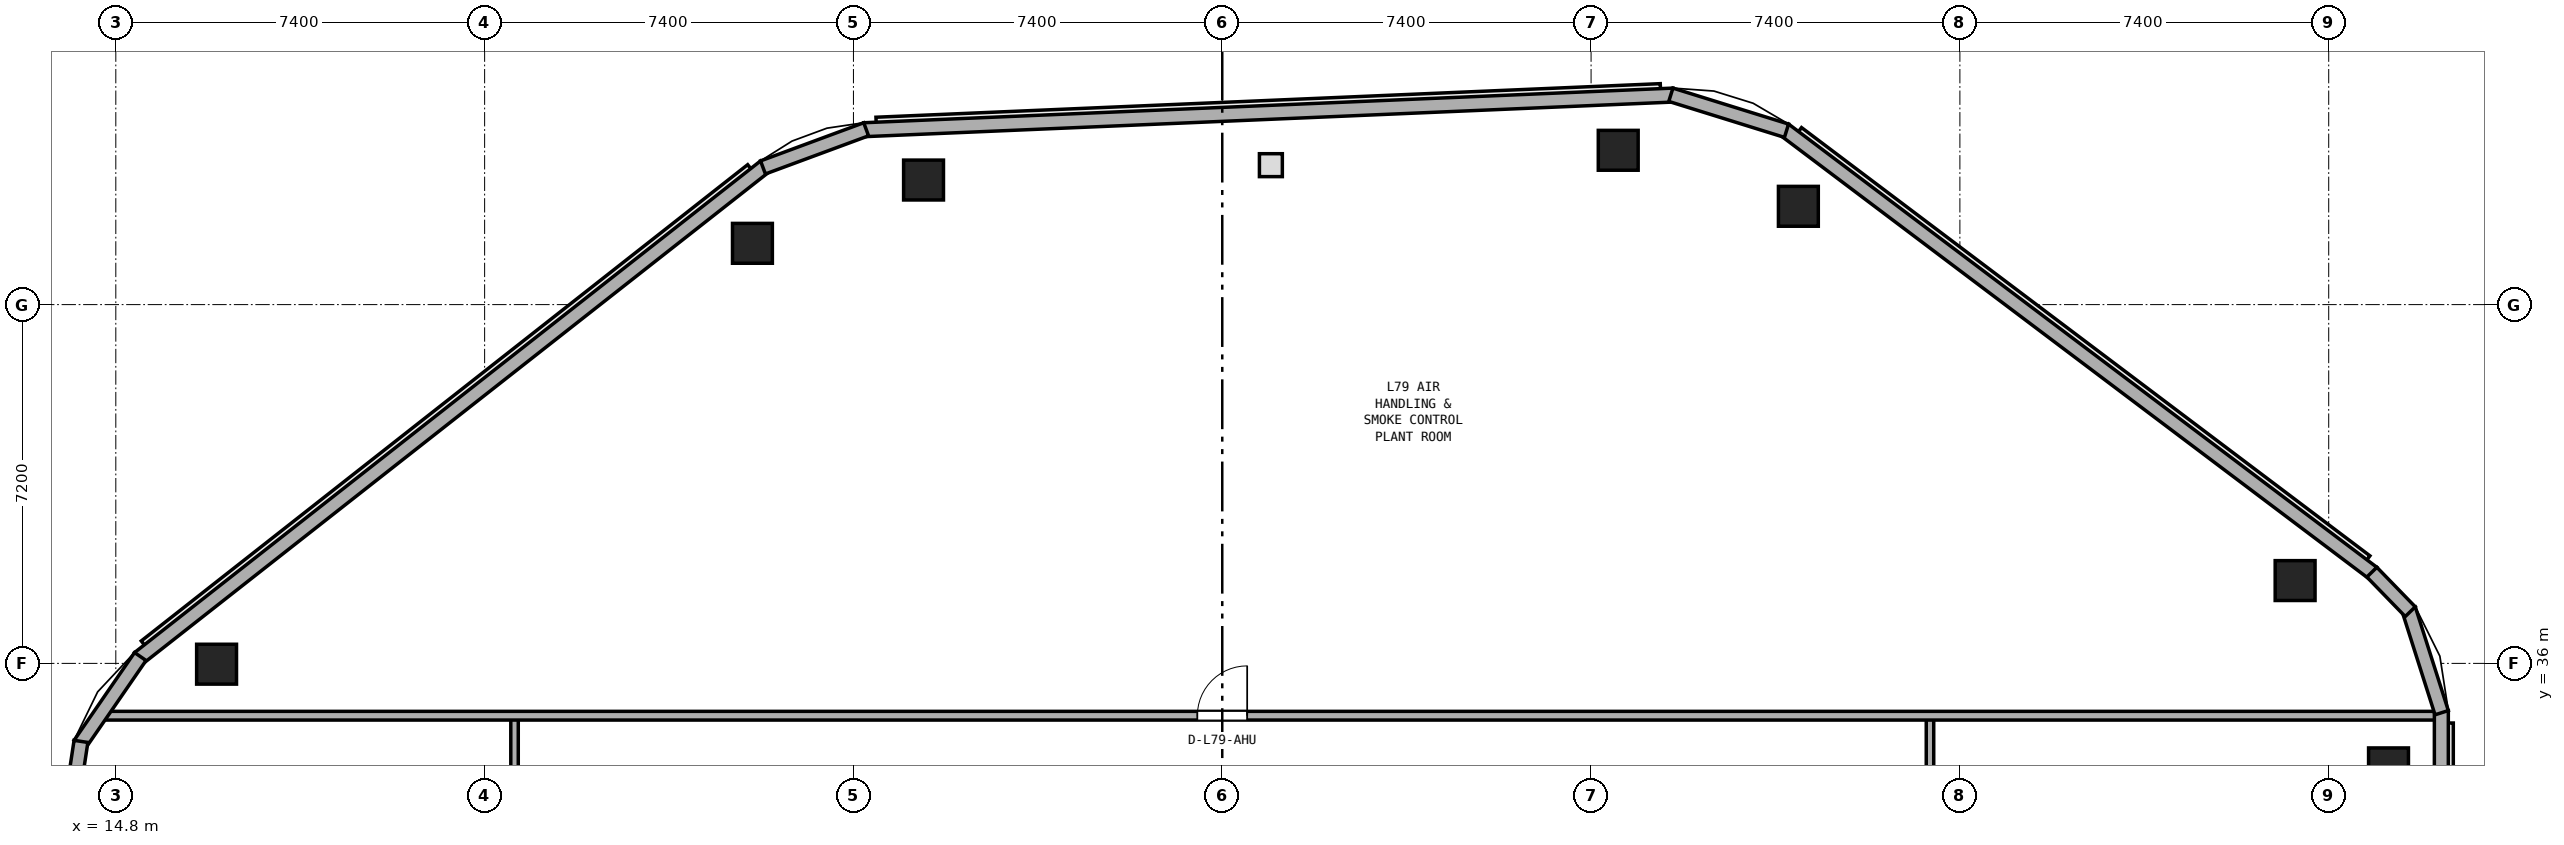
"""IFC4 building model, lengths in metres.
Left out: names, types, materials, properties, quantities, classifications, styles, units other than length and angle.
Written with IfcOpenShell. Run it as: python <this file> out.ifc"""

import sys

from ifc_helpers import new_model, si_unit, direction, frame, frame_2d, origin, origin_2d, place, context, subcontext, project, spatial, rectangle, extrude, element, fill, save


model = new_model("IFC4")
c1 = context("Model", 3, precision=1e-05, world=origin(), true_north=direction((0.0, 1.0)))
c2 = subcontext(c1, "Body", "Model", "MODEL_VIEW")
j1 = project(units=[si_unit("LENGTHUNIT", "METRE"), si_unit("PLANEANGLEUNIT", "RADIAN")], contexts=[c1])
p1 = place(None, origin())
s1 = spatial("IfcSite", under=j1, at=p1, CompositionType="ELEMENT")
p2 = place(p1, origin())
s2 = spatial("IfcBuilding", under=s1, at=p2, CompositionType="ELEMENT")
p3 = place(p2, frame((0.0, 0.0, 308.6)))
s3 = spatial("IfcBuildingStorey", under=s2, at=p3, CompositionType="ELEMENT", Elevation=308.6)
for number, where, z_axis, x_axis in (
    (1, (60.4, 33.903, 0.0), (0.0, 0.0, 1.0), (1.0, 0.0, 0.0)),
    (2, (58.526, 37.662, 0.0), (0.0, 0.0, 1.0), (1.0, 0.0, 0.0)),
    (3, (48.559, 45.173, 0.0), (0.0, 0.0, 1.0), (1.0, 0.0, 0.0)),
    (4, (44.945, 46.297, 0.0), (0.0, 0.0, 1.0), (1.0, 0.0, 0.0)),
    (5, (31.007, 45.7, 0.0), (0.0, 0.0, 1.0), (1.0, 0.0, 0.0)),
    (6, (27.573, 44.43, 0.0), (0.0, 0.0, 1.0), (1.0, 0.0, 0.0)),
    (7, (16.822, 35.984, 0.0), (0.0, 0.0, 1.0), (1.0, 0.0, 0.0)),
):
    element("IfcColumn", number, at=place(p3, frame(where, z_axis=z_axis, x_axis=x_axis)), inside=s3, PredefinedType="COLUMN", context=c2, shape_type="SweptSolid", body=[
        extrude(rectangle(XDim=0.8, YDim=0.8, at=origin_2d()), origin(), (0.0, 0.0, 1.0), 4.8),
    ])
p4 = place(p3, frame((51.2, 15.45, 0.0), z_axis=(0.0, 0.0, 1.0), x_axis=(0.0, 1.0, 0.0)))
e8 = element("IfcWall", 8, at=p4, inside=s3, PredefinedType="PARTITIONING", context=c2, shape_type="SweptSolid", body=[
    extrude(rectangle(XDim=19.5, YDim=0.15, at=frame_2d((9.75, 0.0))), origin(), (0.0, 0.0, 1.0), 4.52),
])
p5 = place(p4, frame((9.15, 0.0, 0.0)))
e9 = element("IfcOpeningElement", 9, at=p5, cuts=e8, PredefinedType="OPENING", context=c2, shape_type="SweptSolid", body=[
    extrude(rectangle(XDim=1.2, YDim=2.15, at=frame_2d((0.6, 1.075))), frame((0.0, 0.085, 0.0), z_axis=(0.0, -1.0, 0.0), x_axis=(1.0, 0.0, 0.0)), (0.0, 0.0, 1.0), 0.17),
])
p6 = place(p3, frame((22.8, 15.45, 0.0), z_axis=(0.0, 0.0, 1.0), x_axis=(0.0, 1.0, 0.0)))
e10 = element("IfcWall", 10, at=p6, inside=s3, PredefinedType="PARTITIONING", context=c2, shape_type="SweptSolid", body=[
    extrude(rectangle(XDim=19.5, YDim=0.15, at=frame_2d((9.75, 0.0))), origin(), (0.0, 0.0, 1.0), 4.52),
])
p7 = place(p6, frame((9.25, 0.0, 0.0)))
e11 = element("IfcOpeningElement", 11, at=p7, cuts=e10, PredefinedType="OPENING", context=c2, shape_type="SweptSolid", body=[
    extrude(rectangle(XDim=1.0, YDim=2.04, at=frame_2d((0.5, 1.02))), frame((0.0, 0.085, 0.0), z_axis=(0.0, -1.0, 0.0), x_axis=(1.0, 0.0, 0.0)), (0.0, 0.0, 1.0), 0.17),
])
p8 = place(p3, frame((14.408, 34.95, 0.0), z_axis=(0.0, 0.0, 1.0), x_axis=(1.0, 0.0, 0.0)))
e12 = element("IfcWall", 12, at=p8, inside=s3, PredefinedType="PARTITIONING", context=c2, shape_type="SweptSolid", body=[
    extrude(rectangle(XDim=46.987, YDim=0.175, at=frame_2d((23.494, 0.0))), origin(), (0.0, 0.0, 1.0), 2.12),
])
p9 = place(p8, frame((22.092, 0.0, 0.0)))
e13 = element("IfcOpeningElement", 13, at=p9, cuts=e12, PredefinedType="OPENING", context=c2, shape_type="SweptSolid", body=[
    extrude(rectangle(XDim=1.0, YDim=2.04, at=frame_2d((0.5, 1.02))), frame((0.0, 0.097, 0.0), z_axis=(0.0, -1.0, 0.0), x_axis=(1.0, 0.0, 0.0)), (0.0, 0.0, 1.0), 0.195),
])
p10 = place(p3, frame((61.46, 16.564, 0.0), z_axis=(0.0, 0.0, 1.0), x_axis=(0.0, 1.0, 0.0)))
e14 = element("IfcWall", 14, at=p10, inside=s3, PredefinedType="STANDARD", context=c2, shape_type="SweptSolid", body=[
    extrude(rectangle(XDim=18.489, YDim=0.28, at=frame_2d((9.245, 0.0))), origin(), (0.0, 0.0, 1.0), 4.52),
])
p11 = place(p3, frame((60.082, 37.816, 0.0), z_axis=(0.0, 0.0, 1.0), x_axis=(-0.798634170009, 0.601816801438, 0.0)))
e15 = element("IfcWall", 15, at=p11, inside=s3, PredefinedType="STANDARD", context=c2, shape_type="SweptSolid", body=[
    extrude(rectangle(XDim=14.78, YDim=0.28, at=frame_2d((7.39, 0.0))), origin(), (0.0, 0.0, 1.0), 4.52),
])
p12 = place(p3, frame((46.048, 47.405, 0.0), z_axis=(0.0, 0.0, 1.0), x_axis=(-0.999084905352, -0.0427709235, 0.0)))
e16 = element("IfcWall", 16, at=p12, inside=s3, PredefinedType="STANDARD", context=c2, shape_type="SweptSolid", body=[
    extrude(rectangle(XDim=16.251, YDim=0.28, at=frame_2d((8.125, 0.0))), origin(), (0.0, 0.0, 1.0), 4.52),
])
p13 = place(p3, frame((27.823, 45.974, 0.0), z_axis=(0.0, 0.0, 1.0), x_axis=(-0.786382513527, -0.617739866303, 0.0)))
e17 = element("IfcWall", 17, at=p13, inside=s3, PredefinedType="STANDARD", context=c2, shape_type="SweptSolid", body=[
    extrude(rectangle(XDim=15.972, YDim=0.28, at=frame_2d((7.986, 0.0))), origin(), (0.0, 0.0, 1.0), 4.52),
])
p14 = place(p3, frame((61.467, 35.01, 0.0), z_axis=(0.0, 0.0, 1.0), x_axis=(-0.303461906599, 0.952843571235, 0.0)))
e18 = element("IfcWall", 18, at=p14, inside=s3, PredefinedType="STANDARD", context=c2, shape_type="SweptSolid", body=[
    extrude(rectangle(XDim=2.185, YDim=0.28, at=frame_2d((1.093, 0.0))), origin(), (0.0, 0.0, 1.0), 4.52),
])
p15 = place(p3, frame((60.836, 37.038, 0.0), z_axis=(0.0, 0.0, 1.0), x_axis=(-0.69665259331, 0.717408645219, 0.0)))
e19 = element("IfcWall", 19, at=p15, inside=s3, PredefinedType="STANDARD", context=c2, shape_type="SweptSolid", body=[
    extrude(rectangle(XDim=1.106, YDim=0.28, at=frame_2d((0.553, 0.0))), origin(), (0.0, 0.0, 1.0), 4.52),
])
p16 = place(p3, frame((48.321, 46.689, 0.0), z_axis=(0.0, 0.0, 1.0), x_axis=(-0.954888433756, 0.296964777505, 0.0)))
e20 = element("IfcWall", 20, at=p16, inside=s3, PredefinedType="STANDARD", context=c2, shape_type="SweptSolid", body=[
    extrude(rectangle(XDim=2.43, YDim=0.28, at=frame_2d((1.215, 0.0))), origin(), (0.0, 0.0, 1.0), 4.52),
])
p17 = place(p3, frame((29.855, 46.718, 0.0), z_axis=(0.0, 0.0, 1.0), x_axis=(-0.937856802349, -0.347022504007, 0.0)))
e21 = element("IfcWall", 21, at=p17, inside=s3, PredefinedType="STANDARD", context=c2, shape_type="SweptSolid", body=[
    extrude(rectangle(XDim=2.207, YDim=0.28, at=frame_2d((1.104, 0.0))), origin(), (0.0, 0.0, 1.0), 4.52),
])
p18 = place(p3, frame((15.292, 36.138, 0.0), z_axis=(0.0, 0.0, 1.0), x_axis=(-0.567356835945, -0.823472052171, 0.0)))
e22 = element("IfcWall", 22, at=p18, inside=s3, PredefinedType="STANDARD", context=c2, shape_type="SweptSolid", body=[
    extrude(rectangle(XDim=2.139, YDim=0.28, at=frame_2d((1.07, 0.0))), origin(), (0.0, 0.0, 1.0), 4.52),
])
p19 = place(p3, frame((14.101, 34.435, 0.0), z_axis=(0.0, 0.0, 1.0), x_axis=(-0.150072778638, -0.988674952202, 0.0)))
e23 = element("IfcWall", 23, at=p19, inside=s3, PredefinedType="STANDARD", context=c2, shape_type="SweptSolid", body=[
    extrude(rectangle(XDim=1.082, YDim=0.28, at=frame_2d((0.541, 0.0))), origin(), (0.0, 0.0, 1.0), 4.52),
])
p20 = place(p9, origin())
e24 = element("IfcDoor", 24, at=p20, inside=s3, OperationType="SINGLE_SWING_RIGHT", PredefinedType="DOOR", context=c2, shape_type="SweptSolid", body=[
    extrude(rectangle(XDim=1.0, YDim=2.04, at=frame_2d((0.5, 1.02))), frame((0.0, 0.025, 0.0), z_axis=(0.0, -1.0, 0.0), x_axis=(1.0, 0.0, 0.0)), (0.0, 0.0, 1.0), 0.05),
])
fill(e13, e24)
save(model, sys.argv[1])
